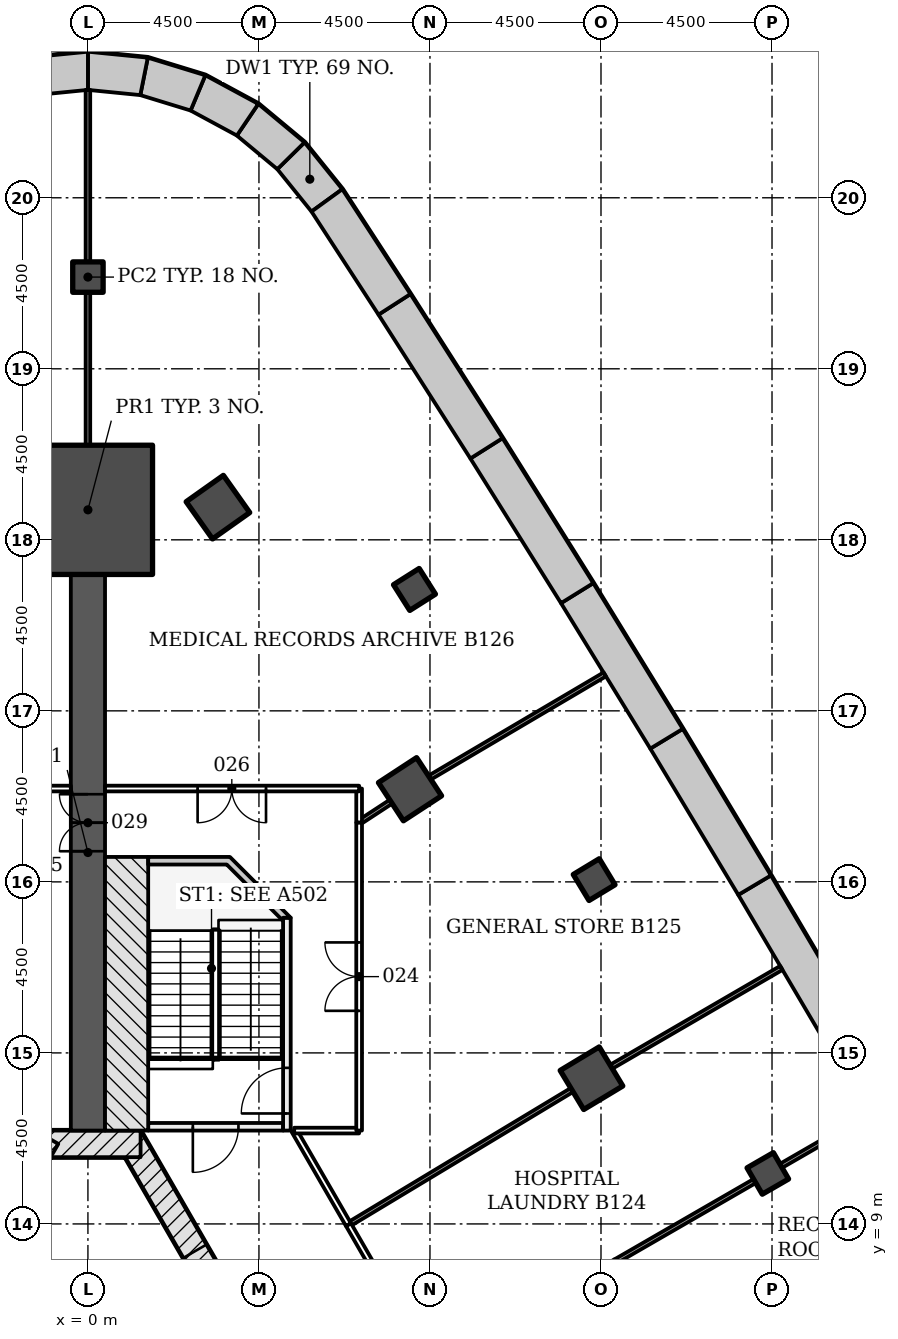
"""IFC4 building model, lengths in metres.
Left out: names, types, materials, properties, quantities, classifications, styles, units other than length and angle.
Written with IfcOpenShell. Run it as: python <this file> out.ifc"""

import sys

from ifc_helpers import new_model, si_unit, direction, frame, frame_2d, origin, origin_2d, place, context, subcontext, project, spatial, polyline, rectangle, outline, extrude, element, fill, save


model = new_model("IFC4")
c1 = context("Model", 3, precision=1e-05, world=origin(), true_north=direction((0.0, 1.0)))
c2 = subcontext(c1, "Body", "Model", "MODEL_VIEW")
j1 = project(units=[si_unit("LENGTHUNIT", "METRE"), si_unit("PLANEANGLEUNIT", "RADIAN")], contexts=[c1])
p1 = place(None, origin())
s1 = spatial("IfcSite", under=j1, at=p1, CompositionType="ELEMENT")
p2 = place(p1, origin())
s2 = spatial("IfcBuilding", under=s1, at=p2, CompositionType="ELEMENT")
p3 = place(p2, frame((0.0, 0.0, -4.5)))
s3 = spatial("IfcBuildingStorey", under=s2, at=p3, CompositionType="ELEMENT", Elevation=-4.5)
p4 = place(p3, origin())
e1 = element("IfcWall", 1, at=p4, inside=s3, PredefinedType="SOLIDWALL", context=c2, shape_type="SweptSolid", body=[
    extrude(outline(polyline([(6.694, 36.225), (5.699, 37.458), (4.984, 36.752), (5.883, 35.637), (6.694, 36.225)])), origin(), (0.0, 0.0, 1.0), 4.25),
])
p5 = place(p3, origin())
e2 = element("IfcWall", 2, at=p5, inside=s3, PredefinedType="SOLIDWALL", context=c2, shape_type="SweptSolid", body=[
    extrude(outline(polyline([(5.699, 37.458), (4.482, 38.47), (3.919, 37.638), (4.984, 36.752), (5.699, 37.458)])), origin(), (0.0, 0.0, 1.0), 4.25),
])
p6 = place(p3, origin())
e3 = element("IfcWall", 3, at=p6, inside=s3, PredefinedType="SOLIDWALL", context=c2, shape_type="SweptSolid", body=[
    extrude(outline(polyline([(4.482, 38.47), (3.089, 39.223), (2.701, 38.296), (3.919, 37.638), (4.482, 38.47)])), origin(), (0.0, 0.0, 1.0), 4.25),
])
p7 = place(p3, origin())
e4 = element("IfcWall", 4, at=p7, inside=s3, PredefinedType="SOLIDWALL", context=c2, shape_type="SweptSolid", body=[
    extrude(outline(polyline([(3.089, 39.223), (1.576, 39.687), (1.378, 38.702), (2.701, 38.296), (3.089, 39.223)])), origin(), (0.0, 0.0, 1.0), 4.25),
])
p8 = place(p3, origin())
e5 = element("IfcWall", 5, at=p8, inside=s3, PredefinedType="SOLIDWALL", context=c2, shape_type="SweptSolid", body=[
    extrude(outline(polyline([(1.576, 39.687), (0.0, 39.844), (0.0, 38.839), (1.378, 38.702), (1.576, 39.687)])), origin(), (0.0, 0.0, 1.0), 4.25),
])
p9 = place(p3, origin())
e6 = element("IfcWall", 6, at=p9, inside=s3, PredefinedType="SOLIDWALL", context=c2, shape_type="SweptSolid", body=[
    extrude(outline(polyline([(0.0, 39.844), (-1.576, 39.687), (-1.378, 38.702), (0.0, 38.839), (0.0, 39.844)])), origin(), (0.0, 0.0, 1.0), 4.25),
])
p10 = place(p3, origin())
e7 = element("IfcWall", 7, at=p10, inside=s3, PredefinedType="SOLIDWALL", context=c2, shape_type="SweptSolid", body=[
    extrude(outline(polyline([(20.256, 14.293), (17.971, 18.17), (17.112, 17.658), (19.393, 13.789), (20.256, 14.293)])), origin(), (0.0, 0.0, 1.0), 4.25),
])
p11 = place(p3, origin())
e8 = element("IfcWall", 8, at=p11, inside=s3, PredefinedType="SOLIDWALL", context=c2, shape_type="SweptSolid", body=[
    extrude(outline(polyline([(17.971, 18.17), (15.652, 22.026), (14.797, 21.506), (17.112, 17.658), (17.971, 18.17)])), origin(), (0.0, 0.0, 1.0), 4.25),
])
p12 = place(p3, origin())
e9 = element("IfcWall", 9, at=p12, inside=s3, PredefinedType="SOLIDWALL", context=c2, shape_type="SweptSolid", body=[
    extrude(outline(polyline([(15.652, 22.026), (13.297, 25.861), (12.448, 25.334), (14.797, 21.506), (15.652, 22.026)])), origin(), (0.0, 0.0, 1.0), 4.25),
])
p13 = place(p3, origin())
e10 = element("IfcWall", 10, at=p13, inside=s3, PredefinedType="SOLIDWALL", context=c2, shape_type="SweptSolid", body=[
    extrude(outline(polyline([(13.297, 25.861), (10.909, 29.675), (10.064, 29.14), (12.448, 25.334), (13.297, 25.861)])), origin(), (0.0, 0.0, 1.0), 4.25),
])
p14 = place(p3, origin())
e11 = element("IfcWall", 11, at=p14, inside=s3, PredefinedType="SOLIDWALL", context=c2, shape_type="SweptSolid", body=[
    extrude(outline(polyline([(10.909, 29.675), (8.486, 33.467), (7.646, 32.925), (10.064, 29.14), (10.909, 29.675)])), origin(), (0.0, 0.0, 1.0), 4.25),
])
p15 = place(p3, origin())
e12 = element("IfcWall", 12, at=p15, inside=s3, PredefinedType="SOLIDWALL", context=c2, shape_type="SweptSolid", body=[
    extrude(outline(polyline([(8.486, 33.467), (6.694, 36.225), (5.883, 35.637), (7.646, 32.925), (8.486, 33.467)])), origin(), (0.0, 0.0, 1.0), 4.25),
])
for number, where, z_axis, x_axis in (
    (13, (13.25, 12.834, -0.3), (0.0, 0.0, 1.0), (0.857, 0.516, 0.0)),
    (14, (8.475, 20.438, -0.3), (0.0, 0.0, 1.0), (0.837, 0.547, 0.0)),
    (15, (3.421, 27.86, -0.3), (0.0, 0.0, 1.0), (0.816, 0.578, 0.0)),
):
    element("IfcColumn", number, at=place(p3, frame(where, z_axis=z_axis, x_axis=x_axis)), inside=s3, PredefinedType="COLUMN", context=c2, shape_type="SweptSolid", body=[
        extrude(rectangle(XDim=1.2, YDim=1.2, at=origin_2d()), origin(), (0.0, 0.0, 1.0), 4.55),
    ])
for number, where, z_axis, x_axis in (
    (16, (0.0, 33.913, -0.3), (0.0, 0.0, 1.0), (0.0, 1.0, 0.0)),
    (17, (17.89, 10.329, -0.3), (0.0, 0.0, 1.0), (0.866, 0.5, 0.0)),
    (18, (13.32, 18.059, -0.3), (0.0, 0.0, 1.0), (0.856, 0.518, 0.0)),
    (19, (8.592, 25.695, -0.3), (0.0, 0.0, 1.0), (0.845, 0.535, 0.0)),
):
    element("IfcColumn", number, at=place(p3, frame(where, z_axis=z_axis, x_axis=x_axis)), inside=s3, PredefinedType="COLUMN", context=c2, shape_type="SweptSolid", body=[
        extrude(rectangle(XDim=0.8, YDim=0.8, at=origin_2d()), origin(), (0.0, 0.0, 1.0), 4.55),
    ])
p16 = place(p3, frame((10.311, -4.703, -0.3), z_axis=(0.0, 0.0, 1.0), x_axis=(-0.500001446645, 0.866024568562, 0.0)))
e20 = element("IfcWall", 20, at=p16, inside=s3, PredefinedType="SHEAR", context=c2, shape_type="SweptSolid", body=[
    extrude(rectangle(XDim=18.458, YDim=0.7, at=frame_2d((9.229, 0.0))), origin(), (0.0, 0.0, 1.0), 4.55),
])
p17 = place(p16, frame((8.7, 0.0, 0.3)))
e21 = element("IfcOpeningElement", 21, at=p17, cuts=e20, PredefinedType="OPENING", context=c2, shape_type="SweptSolid", body=[
    extrude(rectangle(XDim=1.0, YDim=2.1, at=frame_2d((0.5, 1.05))), frame((0.0, 0.36, 0.0), z_axis=(0.0, -1.0, 0.0), x_axis=(1.0, 0.0, 0.0)), (0.0, 0.0, 1.0), 0.72),
])
p18 = place(p16, frame((4.002, 0.0, 0.3)))
e22 = element("IfcOpeningElement", 22, at=p18, cuts=e20, PredefinedType="OPENING", context=c2, shape_type="SweptSolid", body=[
    extrude(rectangle(XDim=0.9, YDim=2.1, at=frame_2d((0.45, 1.05))), frame((0.0, 0.36, 0.0), z_axis=(0.0, -1.0, 0.0), x_axis=(1.0, 0.0, 0.0)), (0.0, 0.0, 1.0), 0.72),
])
p19 = place(p16, frame((14.093, 0.0, 0.3)))
e23 = element("IfcOpeningElement", 23, at=p19, cuts=e20, PredefinedType="OPENING", context=c2, shape_type="SweptSolid", body=[
    extrude(rectangle(XDim=0.9, YDim=2.1, at=frame_2d((0.45, 1.05))), frame((0.0, 0.36, 0.0), z_axis=(0.0, -1.0, 0.0), x_axis=(1.0, 0.0, 0.0)), (0.0, 0.0, 1.0), 0.72),
])
p20 = place(p3, frame((1.386, 11.106, -0.3), z_axis=(0.0, 0.0, 1.0), x_axis=(-1.0, 0.0, 0.0)))
e24 = element("IfcWall", 24, at=p20, inside=s3, PredefinedType="SHEAR", context=c2, shape_type="SweptSolid", body=[
    extrude(rectangle(XDim=2.771, YDim=0.7, at=frame_2d((1.386, 0.0))), origin(), (0.0, 0.0, 1.0), 4.55),
])
p21 = place(p3, frame((-1.083, 11.281, -0.3), z_axis=(0.0, 0.0, 1.0), x_axis=(-0.500001446645, -0.866024568562, 0.0)))
e25 = element("IfcWall", 25, at=p21, inside=s3, PredefinedType="SHEAR", context=c2, shape_type="SweptSolid", body=[
    extrude(rectangle(XDim=18.458, YDim=0.7, at=frame_2d((9.229, 0.0))), origin(), (0.0, 0.0, 1.0), 4.55),
])
p22 = place(p21, frame((8.979, 0.0, 0.3)))
e26 = element("IfcOpeningElement", 26, at=p22, cuts=e25, PredefinedType="OPENING", context=c2, shape_type="SweptSolid", body=[
    extrude(rectangle(XDim=1.2, YDim=2.1, at=frame_2d((0.6, 1.05))), frame((0.0, 0.36, 0.0), z_axis=(0.0, -1.0, 0.0), x_axis=(1.0, 0.0, 0.0)), (0.0, 0.0, 1.0), 0.72),
])
p23 = place(p21, frame((11.029, 0.0, 0.3)))
e27 = element("IfcOpeningElement", 27, at=p23, cuts=e25, PredefinedType="OPENING", context=c2, shape_type="SweptSolid", body=[
    extrude(rectangle(XDim=1.2, YDim=2.1, at=frame_2d((0.6, 1.05))), frame((0.0, 0.36, 0.0), z_axis=(0.0, -1.0, 0.0), x_axis=(1.0, 0.0, 0.0)), (0.0, 0.0, 1.0), 0.72),
])
p24 = place(p3, frame((0.0, 11.456, -0.3), z_axis=(0.0, 0.0, 1.0), x_axis=(0.0, 1.0, 0.0)))
e28 = element("IfcWall", 28, at=p24, inside=s3, PredefinedType="SHEAR", context=c2, shape_type="SweptSolid", body=[
    extrude(rectangle(XDim=14.633, YDim=0.9, at=frame_2d((7.316, 0.0))), origin(), (0.0, 0.0, 1.0), 4.55),
])
p25 = place(p24, frame((7.35, 0.0, 0.3)))
e29 = element("IfcOpeningElement", 29, at=p25, cuts=e28, PredefinedType="OPENING", context=c2, shape_type="SweptSolid", body=[
    extrude(rectangle(XDim=1.5, YDim=2.1, at=frame_2d((0.75, 1.05))), frame((0.0, 0.46, 0.0), z_axis=(0.0, -1.0, 0.0), x_axis=(1.0, 0.0, 0.0)), (0.0, 0.0, 1.0), 0.92),
])
p26 = place(p3, frame((0.0, 27.789, -0.3), z_axis=(0.0, 0.0, 1.0), x_axis=(0.0, 1.0, 0.0)))
e30 = element("IfcColumn", 30, at=p26, inside=s3, PredefinedType="COLUMN", context=c2, shape_type="SweptSolid", body=[
    extrude(rectangle(XDim=3.4, YDim=3.4, at=origin_2d()), origin(), (0.0, 0.0, 1.0), 4.55),
])
p27 = place(p3, frame((-2.506, 8.115, 0.0), z_axis=(0.0, 0.0, 1.0), x_axis=(0.865996321171, -0.50005036918, 0.0)))
e31 = element("IfcWall", 31, at=p27, inside=s3, PredefinedType="PARTITIONING", context=c2, shape_type="SweptSolid", body=[
    extrude(rectangle(XDim=2.9, YDim=0.25, at=frame_2d((1.45, 0.0))), origin(), (0.0, 0.0, 1.0), 4.25),
])
p28 = place(p3, frame((5.135, 11.556, -0.3), z_axis=(0.0, 0.0, 1.0), x_axis=(-1.0, 0.0, 0.0)))
e32 = element("IfcWall", 32, at=p28, inside=s3, PredefinedType="SHEAR", context=c2, shape_type="SweptSolid", body=[
    extrude(rectangle(XDim=3.55, YDim=0.2, at=frame_2d((1.775, 0.0))), origin(), (0.0, 0.0, 1.0), 4.55),
])
p29 = place(p28, frame((1.175, 0.0, 0.3)))
e33 = element("IfcOpeningElement", 33, at=p29, cuts=e32, PredefinedType="OPENING", context=c2, shape_type="SweptSolid", body=[
    extrude(rectangle(XDim=1.2, YDim=2.1, at=frame_2d((0.6, 1.05))), frame((0.0, 0.11, 0.0), z_axis=(0.0, -1.0, 0.0), x_axis=(1.0, 0.0, 0.0)), (0.0, 0.0, 1.0), 0.22),
])
p30 = place(p3, frame((5.236, 11.456, -0.3), z_axis=(0.0, 0.0, 1.0), x_axis=(0.0, 1.0, 0.0)))
e34 = element("IfcWall", 34, at=p30, inside=s3, PredefinedType="SHEAR", context=c2, shape_type="SweptSolid", body=[
    extrude(rectangle(XDim=5.6, YDim=0.2, at=frame_2d((2.8, 0.0))), origin(), (0.0, 0.0, 1.0), 4.55),
])
p31 = place(p30, frame((0.45, 0.0, 0.3)))
e35 = element("IfcOpeningElement", 35, at=p31, cuts=e34, PredefinedType="OPENING", context=c2, shape_type="SweptSolid", body=[
    extrude(rectangle(XDim=1.2, YDim=2.1, at=frame_2d((0.6, 1.05))), frame((0.0, 0.11, 0.0), z_axis=(0.0, -1.0, 0.0), x_axis=(1.0, 0.0, 0.0)), (0.0, 0.0, 1.0), 0.22),
])
p32 = place(p3, frame((1.018, 11.456, -0.3), z_axis=(0.0, 0.0, 1.0), x_axis=(0.0, 1.0, 0.0)))
e36 = element("IfcWall", 36, at=p32, inside=s3, PredefinedType="SHEAR", context=c2, shape_type="SweptSolid", body=[
    extrude(rectangle(XDim=7.2, YDim=1.136, at=frame_2d((3.6, 0.0))), origin(), (0.0, 0.0, 1.0), 4.55),
])
p33 = place(p3, frame((0.0, 0.0, -0.3)))
e37 = element("IfcWall", 37, at=p33, inside=s3, PredefinedType="SHEAR", context=c2, shape_type="SweptSolid", body=[
    extrude(outline(polyline([(5.336, 17.056), (3.736, 18.656), (1.586, 18.656), (1.586, 18.456), (3.653, 18.456), (5.135, 16.974), (5.135, 17.056), (5.135, 17.056), (5.135, 17.056), (5.135, 17.056), (5.135, 17.056), (5.135, 17.056), (5.135, 17.056), (5.135, 17.056), (5.135, 17.056), (5.135, 17.056), (5.135, 17.056), (5.135, 17.056), (5.135, 17.056), (5.135, 17.056), (5.135, 17.056), (5.135, 17.056), (5.135, 17.056), (5.336, 17.056)])), origin(), (0.0, 0.0, 1.0), 4.55),
])
p34 = place(p3, frame((9.03, 5.214, 0.0), z_axis=(0.0, 0.0, 1.0), x_axis=(-0.499876332206, 0.866096791646, 0.0)))
e38 = element("IfcWall", 38, at=p34, inside=s3, PredefinedType="PARTITIONING", context=c2, shape_type="SweptSolid", body=[
    extrude(rectangle(XDim=4.349, YDim=0.15, at=frame_2d((2.175, 0.0))), origin(), (0.0, 0.0, 1.0), 3.638),
])
p35 = place(p34, frame((1.25, 0.0, 0.0)))
e39 = element("IfcOpeningElement", 39, at=p35, cuts=e38, PredefinedType="OPENING", context=c2, shape_type="SweptSolid", body=[
    extrude(rectangle(XDim=1.8, YDim=2.1, at=frame_2d((0.9, 1.05))), frame((0.0, 0.085, 0.0), z_axis=(0.0, -1.0, 0.0), x_axis=(1.0, 0.0, 0.0)), (0.0, 0.0, 1.0), 0.17),
])
p36 = place(p3, frame((6.855, 8.982, 0.0), z_axis=(0.0, 0.0, 1.0), x_axis=(-0.500176439337, 0.865923512519, 0.0)))
e40 = element("IfcWall", 40, at=p36, inside=s3, PredefinedType="PARTITIONING", context=c2, shape_type="SweptSolid", body=[
    extrude(rectangle(XDim=2.855, YDim=0.15, at=frame_2d((1.427, 0.0))), origin(), (0.0, 0.0, 1.0), 3.638),
])
p37 = place(p3, frame((5.427, 11.456, 0.0), z_axis=(0.0, 0.0, 1.0), x_axis=(1.0, 0.0, 0.0)))
e41 = element("IfcWall", 41, at=p37, inside=s3, PredefinedType="PARTITIONING", context=c2, shape_type="SweptSolid", body=[
    extrude(rectangle(XDim=1.708, YDim=0.15, at=frame_2d((0.854, 0.0))), origin(), (0.0, 0.0, 1.0), 4.25),
])
p38 = place(p3, frame((7.136, 11.457, 0.0), z_axis=(0.0, 0.0, 1.0), x_axis=(0.0, 1.0, 0.0)))
e42 = element("IfcWall", 42, at=p38, inside=s3, PredefinedType="PARTITIONING", context=c2, shape_type="SweptSolid", body=[
    extrude(rectangle(XDim=8.106, YDim=0.15, at=frame_2d((4.053, 0.0))), origin(), (0.0, 0.0, 1.0), 3.638),
])
p39 = place(p38, frame((3.15, 0.0, 0.0)))
e43 = element("IfcOpeningElement", 43, at=p39, cuts=e42, PredefinedType="OPENING", context=c2, shape_type="SweptSolid", body=[
    extrude(rectangle(XDim=1.8, YDim=2.1, at=frame_2d((0.9, 1.05))), frame((0.0, 0.085, 0.0), z_axis=(0.0, -1.0, 0.0), x_axis=(1.0, 0.0, 0.0)), (0.0, 0.0, 1.0), 0.17),
])
p40 = place(p3, frame((7.136, 19.563, 0.0), z_axis=(0.0, 0.0, 1.0), x_axis=(0.0, 1.0, 0.0)))
e44 = element("IfcWall", 44, at=p40, inside=s3, PredefinedType="PARTITIONING", context=c2, shape_type="SweptSolid", body=[
    extrude(rectangle(XDim=0.893, YDim=0.15, at=frame_2d((0.447, 0.0))), origin(), (0.0, 0.0, 1.0), 3.638),
])
p41 = place(p3, frame((7.136, 20.456, 0.0), z_axis=(0.0, 0.0, 1.0), x_axis=(-1.0, 0.0, 0.0)))
e45 = element("IfcWall", 45, at=p41, inside=s3, PredefinedType="PARTITIONING", context=c2, shape_type="SweptSolid", body=[
    extrude(rectangle(XDim=6.686, YDim=0.15, at=frame_2d((3.343, 0.0))), origin(), (0.0, 0.0, 1.0), 3.638),
])
p42 = place(p41, frame((2.45, 0.0, 0.0)))
e46 = element("IfcOpeningElement", 46, at=p42, cuts=e45, PredefinedType="OPENING", context=c2, shape_type="SweptSolid", body=[
    extrude(rectangle(XDim=1.8, YDim=2.1, at=frame_2d((0.9, 1.05))), frame((0.0, 0.085, 0.0), z_axis=(0.0, -1.0, 0.0), x_axis=(1.0, 0.0, 0.0)), (0.0, 0.0, 1.0), 0.17),
])
p43 = place(p3, frame((17.543, 10.128, 0.0), z_axis=(0.0, 0.0, 1.0), x_axis=(-0.865987734199, -0.50006523996, 0.0)))
e47 = element("IfcWall", 47, at=p43, inside=s3, PredefinedType="PARTITIONING", context=c2, shape_type="SweptSolid", body=[
    extrude(rectangle(XDim=4.233, YDim=0.12, at=frame_2d((2.117, 0.0))), origin(), (0.0, 0.0, 1.0), 3.638),
])
p44 = place(p3, frame((20.515, 11.844, 0.0), z_axis=(0.0, 0.0, 1.0), x_axis=(-0.865984721421, -0.500070457302, 0.0)))
e48 = element("IfcWall", 48, at=p44, inside=s3, PredefinedType="PARTITIONING", context=c2, shape_type="SweptSolid", body=[
    extrude(rectangle(XDim=2.631, YDim=0.12, at=frame_2d((1.316, 0.0))), origin(), (0.0, 0.0, 1.0), 4.25),
])
p45 = place(p3, frame((12.736, 12.524, 0.0), z_axis=(0.0, 0.0, 1.0), x_axis=(-0.856559377083, -0.516048479827, 0.0)))
e49 = element("IfcWall", 49, at=p45, inside=s3, PredefinedType="PARTITIONING", context=c2, shape_type="SweptSolid", body=[
    extrude(rectangle(XDim=6.864, YDim=0.12, at=frame_2d((3.432, 0.0))), origin(), (0.0, 0.0, 1.0), 3.638),
])
p46 = place(p3, frame((18.245, 15.736, 0.0), z_axis=(0.0, 0.0, 1.0), x_axis=(-0.864615819332, -0.502433562734, 0.0)))
e50 = element("IfcWall", 50, at=p46, inside=s3, PredefinedType="PARTITIONING", context=c2, shape_type="SweptSolid", body=[
    extrude(rectangle(XDim=5.177, YDim=0.12, at=frame_2d((2.588, 0.0))), origin(), (0.0, 0.0, 1.0), 3.633),
])
p47 = place(p3, frame((-0.45, 20.456, 0.0), z_axis=(0.0, 0.0, 1.0), x_axis=(-1.0, 0.0, 0.0)))
e51 = element("IfcWall", 51, at=p47, inside=s3, PredefinedType="PARTITIONING", context=c2, shape_type="SweptSolid", body=[
    extrude(rectangle(XDim=1.8, YDim=0.15, at=frame_2d((0.9, 0.0))), origin(), (0.0, 0.0, 1.0), 3.638),
])
p48 = place(p3, frame((7.973, 20.109, 0.0), z_axis=(0.0, 0.0, 1.0), x_axis=(-0.836986858992, -0.547222987341, 0.0)))
e52 = element("IfcWall", 52, at=p48, inside=s3, PredefinedType="PARTITIONING", context=c2, shape_type="SweptSolid", body=[
    extrude(rectangle(XDim=0.998, YDim=0.12, at=frame_2d((0.499, 0.0))), origin(), (0.0, 0.0, 1.0), 3.638),
])
p49 = place(p3, frame((13.599, 23.459, 0.0), z_axis=(0.0, 0.0, 1.0), x_axis=(-0.861446814084, -0.507847798563, 0.0)))
e53 = element("IfcWall", 53, at=p49, inside=s3, PredefinedType="PARTITIONING", context=c2, shape_type="SweptSolid", body=[
    extrude(rectangle(XDim=5.348, YDim=0.12, at=frame_2d((2.674, 0.0))), origin(), (0.0, 0.0, 1.0), 3.633),
])
p50 = place(p3, frame((0.0, 29.489, 0.0), z_axis=(0.0, 0.0, 1.0), x_axis=(0.0, 1.0, 0.0)))
e54 = element("IfcWall", 54, at=p50, inside=s3, PredefinedType="PARTITIONING", context=c2, shape_type="SweptSolid", body=[
    extrude(rectangle(XDim=4.024, YDim=0.12, at=frame_2d((2.012, 0.0))), origin(), (0.0, 0.0, 1.0), 3.717),
])
p51 = place(p3, frame((0.0, 34.313, 0.0), z_axis=(0.0, 0.0, 1.0), x_axis=(0.0, 1.0, 0.0)))
e55 = element("IfcWall", 55, at=p51, inside=s3, PredefinedType="PARTITIONING", context=c2, shape_type="SweptSolid", body=[
    extrude(rectangle(XDim=4.526, YDim=0.12, at=frame_2d((2.263, 0.0))), origin(), (0.0, 0.0, 1.0), 4.25),
])
p52 = place(p19, origin())
e56 = element("IfcDoor", 56, at=p52, inside=s3, OperationType="SINGLE_SWING_LEFT", PredefinedType="DOOR", context=c2, shape_type="SweptSolid", body=[
    extrude(rectangle(XDim=0.9, YDim=2.1, at=frame_2d((0.45, 1.05))), frame((0.0, 0.075, 0.0), z_axis=(0.0, -1.0, 0.0), x_axis=(1.0, 0.0, 0.0)), (0.0, 0.0, 1.0), 0.15),
])
fill(e23, e56)
p53 = place(p29, origin())
e57 = element("IfcDoor", 57, at=p53, inside=s3, OperationType="SINGLE_SWING_RIGHT", PredefinedType="DOOR", context=c2, shape_type="SweptSolid", body=[
    extrude(rectangle(XDim=1.2, YDim=2.1, at=frame_2d((0.6, 1.05))), frame((0.0, 0.025, 0.0), z_axis=(0.0, -1.0, 0.0), x_axis=(1.0, 0.0, 0.0)), (0.0, 0.0, 1.0), 0.05),
])
fill(e33, e57)
p54 = place(p31, origin())
e58 = element("IfcDoor", 58, at=p54, inside=s3, OperationType="SINGLE_SWING_LEFT", PredefinedType="DOOR", context=c2, shape_type="SweptSolid", body=[
    extrude(rectangle(XDim=1.2, YDim=2.1, at=frame_2d((0.6, 1.05))), frame((0.0, 0.025, 0.0), z_axis=(0.0, -1.0, 0.0), x_axis=(1.0, 0.0, 0.0)), (0.0, 0.0, 1.0), 0.05),
])
fill(e35, e58)
p55 = place(p39, origin())
e59 = element("IfcDoor", 59, at=p55, inside=s3, OperationType="DOUBLE_DOOR_SINGLE_SWING", PredefinedType="DOOR", context=c2, shape_type="SweptSolid", body=[
    extrude(rectangle(XDim=1.8, YDim=2.1, at=frame_2d((0.9, 1.05))), frame((0.0, 0.025, 0.0), z_axis=(0.0, -1.0, 0.0), x_axis=(1.0, 0.0, 0.0)), (0.0, 0.0, 1.0), 0.05),
])
fill(e43, e59)
p56 = place(p42, origin())
e60 = element("IfcDoor", 60, at=p56, inside=s3, OperationType="DOUBLE_DOOR_SINGLE_SWING", PredefinedType="DOOR", context=c2, shape_type="SweptSolid", body=[
    extrude(rectangle(XDim=1.8, YDim=2.1, at=frame_2d((0.9, 1.05))), frame((0.0, 0.025, 0.0), z_axis=(0.0, -1.0, 0.0), x_axis=(1.0, 0.0, 0.0)), (0.0, 0.0, 1.0), 0.05),
])
fill(e46, e60)
p57 = place(p25, origin())
e61 = element("IfcDoor", 61, at=p57, inside=s3, OperationType="DOUBLE_DOOR_SINGLE_SWING", PredefinedType="DOOR", context=c2, shape_type="SweptSolid", body=[
    extrude(rectangle(XDim=1.5, YDim=2.1, at=frame_2d((0.75, 1.05))), frame((0.0, 0.025, 0.0), z_axis=(0.0, -1.0, 0.0), x_axis=(1.0, 0.0, 0.0)), (0.0, 0.0, 1.0), 0.05),
])
fill(e29, e61)
save(model, sys.argv[1])
